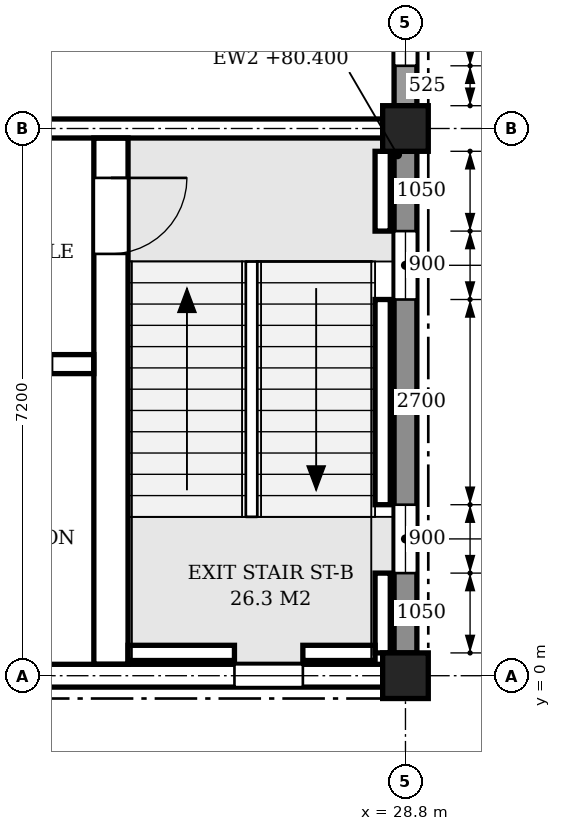
"""IFC4 building model, lengths in metres.
Left out: names, types, materials, properties, quantities, classifications, styles, units other than length and angle.
Written with IfcOpenShell. Run it as: python <this file> out.ifc"""

import sys

from ifc_helpers import new_model, si_unit, direction, frame, frame_2d, origin, origin_2d, place, context, subcontext, project, spatial, polyline, rectangle, outline, extrude, element, fill, save


model = new_model("IFC4")
c1 = context("Model", 3, precision=1e-05, world=origin(), true_north=direction((0.0, 1.0)))
c2 = subcontext(c1, "Body", "Model", "MODEL_VIEW")
j1 = project(units=[si_unit("LENGTHUNIT", "METRE"), si_unit("PLANEANGLEUNIT", "RADIAN")], contexts=[c1])
p1 = place(None, origin())
s1 = spatial("IfcSite", under=j1, at=p1, CompositionType="ELEMENT")
p2 = place(p1, origin())
s2 = spatial("IfcBuilding", under=s1, at=p2, CompositionType="ELEMENT")
p3 = place(p2, frame((0.0, 0.0, 76.8)))
s3 = spatial("IfcBuildingStorey", under=s2, at=p3, CompositionType="ELEMENT", Elevation=76.8)
for number, where, z_axis, x_axis in (
    (1, (28.8, 0.0, 0.0), (0.0, 0.0, 1.0), (1.0, 0.0, 0.0)),
    (2, (28.8, 7.2, 0.0), (0.0, 0.0, 1.0), (1.0, 0.0, 0.0)),
):
    element("IfcColumn", number, at=place(p3, frame(where, z_axis=z_axis, x_axis=x_axis)), inside=s3, PredefinedType="COLUMN", context=c2, shape_type="SweptSolid", body=[
        extrude(rectangle(XDim=0.6, YDim=0.6, at=origin_2d()), origin(), (0.0, 0.0, 1.0), 4.5),
    ])
p4 = place(p3, frame((21.9, 0.0, 0.0), z_axis=(0.0, 0.0, 1.0), x_axis=(1.0, 0.0, 0.0)))
e3 = element("IfcWall", 3, at=p4, inside=s3, PredefinedType="STANDARD", context=c2, shape_type="SweptSolid", body=[
    extrude(rectangle(XDim=6.6, YDim=0.3, at=frame_2d((3.3, 0.0))), origin(), (0.0, 0.0, 1.0), 3.6),
])
p5 = place(p4, frame((4.65, 0.0, 0.9)))
e4 = element("IfcOpeningElement", 4, at=p5, cuts=e3, PredefinedType="OPENING", context=c2, shape_type="SweptSolid", body=[
    extrude(outline(polyline([(0.0, 0.0), (0.9, 0.0), (0.9, 2.15), (0.45, 2.6), (0.0, 2.15), (0.0, 0.0)])), frame((0.0, 0.16, 0.0), z_axis=(0.0, -1.0, 0.0), x_axis=(1.0, 0.0, 0.0)), (0.0, 0.0, 1.0), 0.32),
])
p6 = place(p3, frame((28.8, 0.3, 0.0), z_axis=(0.0, 0.0, 1.0), x_axis=(0.0, 1.0, 0.0)))
e5 = element("IfcWall", 5, at=p6, inside=s3, PredefinedType="STANDARD", context=c2, shape_type="SweptSolid", body=[
    extrude(rectangle(XDim=6.6, YDim=0.3, at=frame_2d((3.3, 0.0))), origin(), (0.0, 0.0, 1.0), 3.6),
])
p7 = place(p6, frame((1.05, 0.0, 0.9)))
e6 = element("IfcOpeningElement", 6, at=p7, cuts=e5, PredefinedType="OPENING", context=c2, shape_type="SweptSolid", body=[
    extrude(outline(polyline([(0.0, 0.0), (0.9, 0.0), (0.9, 2.15), (0.45, 2.6), (0.0, 2.15), (0.0, 0.0)])), frame((0.0, 0.16, 0.0), z_axis=(0.0, -1.0, 0.0), x_axis=(1.0, 0.0, 0.0)), (0.0, 0.0, 1.0), 0.32),
])
p8 = place(p6, frame((4.65, 0.0, 0.9)))
e7 = element("IfcOpeningElement", 7, at=p8, cuts=e5, PredefinedType="OPENING", context=c2, shape_type="SweptSolid", body=[
    extrude(outline(polyline([(0.0, 0.0), (0.9, 0.0), (0.9, 2.15), (0.45, 2.6), (0.0, 2.15), (0.0, 0.0)])), frame((0.0, 0.16, 0.0), z_axis=(0.0, -1.0, 0.0), x_axis=(1.0, 0.0, 0.0)), (0.0, 0.0, 1.0), 0.32),
])
p9 = place(p3, frame((28.8, 7.5, 0.0), z_axis=(0.0, 0.0, 1.0), x_axis=(0.0, 1.0, 0.0)))
e8 = element("IfcWall", 8, at=p9, inside=s3, PredefinedType="STANDARD", context=c2, shape_type="SweptSolid", body=[
    extrude(rectangle(XDim=6.6, YDim=0.3, at=frame_2d((3.3, 0.0))), origin(), (0.0, 0.0, 1.0), 3.6),
])
p10 = place(p9, frame((0.525, 0.0, 0.9)))
e9 = element("IfcOpeningElement", 9, at=p10, cuts=e8, PredefinedType="OPENING", context=c2, shape_type="SweptSolid", body=[
    extrude(outline(polyline([(0.0, 0.0), (0.9, 0.0), (0.9, 2.15), (0.45, 2.6), (0.0, 2.15), (0.0, 0.0)])), frame((0.0, 0.16, 0.0), z_axis=(0.0, -1.0, 0.0), x_axis=(1.0, 0.0, 0.0)), (0.0, 0.0, 1.0), 0.32),
])
p11 = place(p9, frame((1.575, 0.0, 0.9)))
e10 = element("IfcOpeningElement", 10, at=p11, cuts=e8, PredefinedType="OPENING", context=c2, shape_type="SweptSolid", body=[
    extrude(outline(polyline([(0.0, 0.0), (0.9, 0.0), (0.9, 2.15), (0.45, 2.6), (0.0, 2.15), (0.0, 0.0)])), frame((0.0, 0.16, 0.0), z_axis=(0.0, -1.0, 0.0), x_axis=(1.0, 0.0, 0.0)), (0.0, 0.0, 1.0), 0.32),
])
p12 = place(p3, frame((21.9, 7.2, 0.0), z_axis=(0.0, 0.0, 1.0), x_axis=(1.0, 0.0, 0.0)))
e11 = element("IfcWall", 11, at=p12, inside=s3, PredefinedType="SHEAR", context=c2, shape_type="SweptSolid", body=[
    extrude(rectangle(XDim=6.6, YDim=0.25, at=frame_2d((3.3, 0.0))), origin(), (0.0, 0.0, 1.0), 3.55),
])
p13 = place(p12, frame((0.55, 0.0, 0.0)))
e12 = element("IfcOpeningElement", 12, at=p13, cuts=e11, PredefinedType="OPENING", context=c2, shape_type="SweptSolid", body=[
    extrude(rectangle(XDim=1.1, YDim=2.1, at=frame_2d((0.55, 1.05))), frame((0.0, 0.135, 0.0), z_axis=(0.0, -1.0, 0.0), x_axis=(1.0, 0.0, 0.0)), (0.0, 0.0, 1.0), 0.27),
])
p14 = place(p3, frame((28.5, 0.3, -0.25), z_axis=(0.0, 0.0, 1.0), x_axis=(0.0, 1.0, 0.0)))
e13 = element("IfcWall", 13, at=p14, inside=s3, PredefinedType="SHEAR", context=c2, shape_type="SweptSolid", body=[
    extrude(rectangle(XDim=1.05, YDim=0.2, at=frame_2d((0.525, 0.0))), origin(), (0.0, 0.0, 1.0), 4.45),
])
p15 = place(p3, frame((28.5, 2.25, -0.25), z_axis=(0.0, 0.0, 1.0), x_axis=(0.0, 1.0, 0.0)))
e14 = element("IfcWall", 14, at=p15, inside=s3, PredefinedType="SHEAR", context=c2, shape_type="SweptSolid", body=[
    extrude(rectangle(XDim=2.7, YDim=0.2, at=frame_2d((1.35, 0.0))), origin(), (0.0, 0.0, 1.0), 4.45),
])
p16 = place(p3, frame((28.5, 5.85, -0.25), z_axis=(0.0, 0.0, 1.0), x_axis=(0.0, 1.0, 0.0)))
e15 = element("IfcWall", 15, at=p16, inside=s3, PredefinedType="SHEAR", context=c2, shape_type="SweptSolid", body=[
    extrude(rectangle(XDim=1.05, YDim=0.2, at=frame_2d((0.525, 0.0))), origin(), (0.0, 0.0, 1.0), 4.45),
])
p17 = place(p3, frame((25.15, 0.3, -0.25), z_axis=(0.0, 0.0, 1.0), x_axis=(1.0, 0.0, 0.0)))
e16 = element("IfcWall", 16, at=p17, inside=s3, PredefinedType="SHEAR", context=c2, shape_type="SweptSolid", body=[
    extrude(rectangle(XDim=1.4, YDim=0.2, at=frame_2d((0.7, 0.0))), origin(), (0.0, 0.0, 1.0), 4.45),
])
p18 = place(p3, frame((27.45, 0.3, -0.25), z_axis=(0.0, 0.0, 1.0), x_axis=(1.0, 0.0, 0.0)))
e17 = element("IfcWall", 17, at=p18, inside=s3, PredefinedType="SHEAR", context=c2, shape_type="SweptSolid", body=[
    extrude(rectangle(XDim=0.95, YDim=0.2, at=frame_2d((0.475, 0.0))), origin(), (0.0, 0.0, 1.0), 4.45),
])
p19 = place(p3, frame((24.925, 0.15, 0.0), z_axis=(0.0, 0.0, 1.0), x_axis=(0.0, 1.0, 0.0)))
e18 = element("IfcWall", 18, at=p19, inside=s3, PredefinedType="SHEAR", context=c2, shape_type="SweptSolid", body=[
    extrude(rectangle(XDim=6.925, YDim=0.45, at=frame_2d((3.462, 0.0))), origin(), (0.0, 0.0, 1.0), 4.2),
])
p20 = place(p19, frame((5.4, 0.0, 0.0)))
e19 = element("IfcOpeningElement", 19, at=p20, cuts=e18, PredefinedType="OPENING", context=c2, shape_type="SweptSolid", body=[
    extrude(rectangle(XDim=1.0, YDim=2.1, at=frame_2d((0.5, 1.05))), frame((0.0, 0.235, 0.0), z_axis=(0.0, -1.0, 0.0), x_axis=(1.0, 0.0, 0.0)), (0.0, 0.0, 1.0), 0.47),
])
p21 = place(p3, frame((21.725, 4.1, 0.0), z_axis=(0.0, 0.0, 1.0), x_axis=(1.0, 0.0, 0.0)))
e20 = element("IfcWall", 20, at=p21, inside=s3, PredefinedType="SHEAR", context=c2, shape_type="SweptSolid", body=[
    extrude(rectangle(XDim=2.975, YDim=0.25, at=frame_2d((1.487, 0.0))), origin(), (0.0, 0.0, 1.0), 4.2),
])
p22 = place(p21, frame((1.525, 0.0, 0.0)))
e21 = element("IfcOpeningElement", 21, at=p22, cuts=e20, PredefinedType="OPENING", context=c2, shape_type="SweptSolid", body=[
    extrude(rectangle(XDim=0.9, YDim=2.1, at=frame_2d((0.45, 1.05))), frame((0.0, 0.135, 0.0), z_axis=(0.0, -1.0, 0.0), x_axis=(1.0, 0.0, 0.0)), (0.0, 0.0, 1.0), 0.27),
])
p23 = place(p7, origin())
e22 = element("IfcWindow", 22, at=p23, inside=s3, PartitioningType="SINGLE_PANEL", PredefinedType="WINDOW", context=c2, shape_type="SweptSolid", body=[
    extrude(outline(polyline([(0.0, 0.0), (0.9, 0.0), (0.9, 2.15), (0.45, 2.6), (0.0, 2.15), (0.0, 0.0)])), frame((0.0, 0.03, 0.0), z_axis=(0.0, -1.0, 0.0), x_axis=(1.0, 0.0, 0.0)), (0.0, 0.0, 1.0), 0.06),
])
fill(e6, e22)
p24 = place(p8, origin())
e23 = element("IfcWindow", 23, at=p24, inside=s3, PartitioningType="SINGLE_PANEL", PredefinedType="WINDOW", context=c2, shape_type="SweptSolid", body=[
    extrude(outline(polyline([(0.0, 0.0), (0.9, 0.0), (0.9, 2.15), (0.45, 2.6), (0.0, 2.15), (0.0, 0.0)])), frame((0.0, 0.03, 0.0), z_axis=(0.0, -1.0, 0.0), x_axis=(1.0, 0.0, 0.0)), (0.0, 0.0, 1.0), 0.06),
])
fill(e7, e23)
p25 = place(p10, origin())
e24 = element("IfcWindow", 24, at=p25, inside=s3, PartitioningType="SINGLE_PANEL", PredefinedType="WINDOW", context=c2, shape_type="SweptSolid", body=[
    extrude(outline(polyline([(0.0, 0.0), (0.9, 0.0), (0.9, 2.15), (0.45, 2.6), (0.0, 2.15), (0.0, 0.0)])), frame((0.0, 0.03, 0.0), z_axis=(0.0, -1.0, 0.0), x_axis=(1.0, 0.0, 0.0)), (0.0, 0.0, 1.0), 0.06),
])
fill(e9, e24)
p26 = place(p5, origin())
e25 = element("IfcWindow", 25, at=p26, inside=s3, PartitioningType="SINGLE_PANEL", PredefinedType="WINDOW", context=c2, shape_type="SweptSolid", body=[
    extrude(outline(polyline([(0.0, 0.0), (0.9, 0.0), (0.9, 2.15), (0.45, 2.6), (0.0, 2.15), (0.0, 0.0)])), frame((0.0, 0.03, 0.0), z_axis=(0.0, -1.0, 0.0), x_axis=(1.0, 0.0, 0.0)), (0.0, 0.0, 1.0), 0.06),
])
fill(e4, e25)
p27 = place(p20, frame((1.0, 0.0, 0.0), z_axis=(0.0, 0.0, 1.0), x_axis=(-1.0, 0.0, 0.0)))
e26 = element("IfcDoor", 26, at=p27, inside=s3, OperationType="SINGLE_SWING_LEFT", PredefinedType="DOOR", context=c2, shape_type="SweptSolid", body=[
    extrude(rectangle(XDim=1.0, YDim=2.1, at=frame_2d((0.5, 1.05))), frame((0.0, 0.025, 0.0), z_axis=(0.0, -1.0, 0.0), x_axis=(1.0, 0.0, 0.0)), (0.0, 0.0, 1.0), 0.05),
])
fill(e19, e26)
save(model, sys.argv[1])
